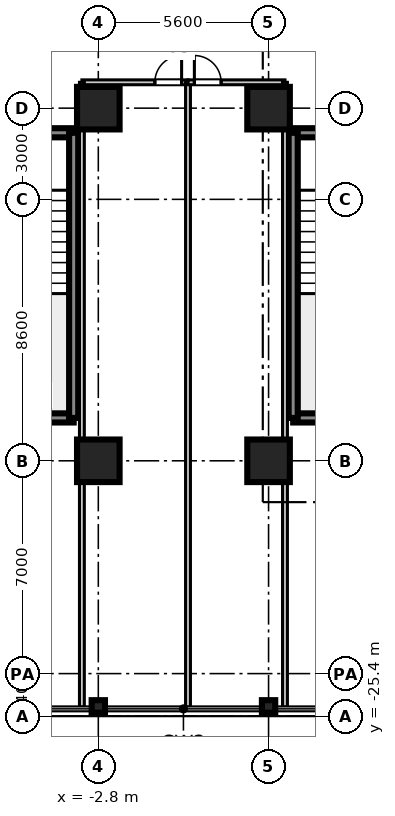
"""IFC4 building model, lengths in metres.
Left out: names, types, materials, properties, quantities, classifications, styles, units other than length and angle.
Written with IfcOpenShell. Run it as: python <this file> out.ifc"""

import sys

from ifc_helpers import new_model, si_unit, direction, frame, frame_2d, origin, origin_2d, place, context, subcontext, project, spatial, rectangle, i_section, extrude, source, transform, mapped, element, fill, save


model = new_model("IFC4")
c1 = context("Model", 3, precision=1e-05, world=origin(), true_north=direction((0.0, 1.0)))
c2 = subcontext(c1, "Body", "Model", "MODEL_VIEW")
j1 = project(units=[si_unit("LENGTHUNIT", "METRE"), si_unit("PLANEANGLEUNIT", "RADIAN")], contexts=[c1])
p1 = place(None, origin())
s1 = spatial("IfcSite", under=j1, at=p1, CompositionType="ELEMENT")
p2 = place(p1, origin())
s2 = spatial("IfcBuilding", under=s1, at=p2, CompositionType="ELEMENT")
p3 = place(p2, frame((0.0, 0.0, 39.7)))
s3 = spatial("IfcBuildingStorey", under=s2, at=p3, CompositionType="ELEMENT", Elevation=39.7)
m1 = source(origin(), c2, "Body", "SweptSolid", [
    extrude(rectangle(XDim=1.4, YDim=1.4, at=origin_2d()), origin(), (0.0, 0.0, 1.0), 3.605),
])
for number, where, z_axis, x_axis in (
    (1, (-2.8, -17.0, 0.0), (0.0, 0.0, 1.0), (1.0, 0.0, 0.0)),
    (2, (-2.8, -5.4, 0.0), (0.0, 0.0, 1.0), (1.0, 0.0, 0.0)),
    (3, (2.8, -17.0, 0.0), (0.0, 0.0, 1.0), (1.0, 0.0, 0.0)),
    (4, (2.8, -5.4, 0.0), (0.0, 0.0, 1.0), (1.0, 0.0, 0.0)),
):
    element("IfcColumn", number, at=place(p3, frame(where, z_axis=z_axis, x_axis=x_axis)), inside=s3, PredefinedType="COLUMN", context=c2, shape_type="MappedRepresentation", body=[
        mapped(m1, transform((0.0, 0.0, 0.0), scale=1.0)),
    ])
m2 = source(origin(), c2, "Body", "SweptSolid", [
    extrude(i_section(OverallWidth=0.412, OverallDepth=0.438, WebThickness=0.023, FlangeThickness=0.036, at=origin_2d()), origin(), (0.0, 0.0, 1.0), 3.605),
])
for number, where, z_axis, x_axis in (
    (5, (-2.8, -25.08, 0.0), (0.0, 0.0, 1.0), (0.0, 1.0, 0.0)),
    (6, (2.8, -25.08, 0.0), (0.0, 0.0, 1.0), (0.0, 1.0, 0.0)),
):
    element("IfcColumn", number, at=place(p3, frame(where, z_axis=z_axis, x_axis=x_axis)), inside=s3, PredefinedType="COLUMN", context=c2, shape_type="MappedRepresentation", body=[
        mapped(m2, transform((0.0, 0.0, 0.0), scale=1.0)),
    ])
m3 = source(origin(), c2, "Body", "SweptSolid", [
    extrude(rectangle(XDim=3.98, YDim=0.3, at=frame_2d((1.99, 0.0))), origin(), (0.0, 0.0, 1.0), 3.37),
])
for number, where, z_axis, x_axis in (
    (7, (3.61, -15.59, 0.0), (0.0, 0.0, 1.0), (1.0, 0.0, 0.0)),
    (8, (3.61, -6.21, 0.0), (0.0, 0.0, 1.0), (1.0, 0.0, 0.0)),
):
    element("IfcWall", number, at=place(p3, frame(where, z_axis=z_axis, x_axis=x_axis)), inside=s3, PredefinedType="SHEAR", context=c2, shape_type="MappedRepresentation", body=[
        mapped(m3, transform((0.0, 0.0, 0.0), scale=1.0)),
    ])
m4 = source(origin(), c2, "Body", "SweptSolid", [
    extrude(rectangle(XDim=9.38, YDim=0.3, at=frame_2d((4.69, 0.0))), origin(), (0.0, 0.0, 1.0), 3.37),
])
p4 = place(p3, frame((3.61, -15.59, 0.0), z_axis=(0.0, 0.0, 1.0), x_axis=(0.0, 1.0, 0.0)))
e9 = element("IfcWall", 9, at=p4, inside=s3, PredefinedType="SHEAR", context=c2, shape_type="MappedRepresentation", body=[
    mapped(m4, transform((0.0, 0.0, 0.0), scale=1.0)),
])
p5 = place(p3, frame((-7.59, -15.59, 0.0), z_axis=(0.0, 0.0, 1.0), x_axis=(1.0, 0.0, 0.0)))
e10 = element("IfcWall", 10, at=p5, inside=s3, PredefinedType="SHEAR", context=c2, shape_type="MappedRepresentation", body=[
    mapped(m3, transform((0.0, 0.0, 0.0), scale=1.0)),
])
p6 = place(p3, frame((-7.59, -6.21, 0.0), z_axis=(0.0, 0.0, 1.0), x_axis=(1.0, 0.0, 0.0)))
e11 = element("IfcWall", 11, at=p6, inside=s3, PredefinedType="SHEAR", context=c2, shape_type="MappedRepresentation", body=[
    mapped(m3, transform((0.0, 0.0, 0.0), scale=1.0)),
])
p7 = place(p6, frame((1.44, 0.0, 0.0)))
e12 = element("IfcOpeningElement", 12, at=p7, cuts=e11, PredefinedType="OPENING", context=c2, shape_type="SweptSolid", body=[
    extrude(rectangle(XDim=1.1, YDim=2.15, at=frame_2d((0.55, 1.075))), frame((0.0, 0.16, 0.0), z_axis=(0.0, -1.0, 0.0), x_axis=(1.0, 0.0, 0.0)), (0.0, 0.0, 1.0), 0.32),
])
p8 = place(p3, frame((-3.61, -15.59, 0.0), z_axis=(0.0, 0.0, 1.0), x_axis=(0.0, 1.0, 0.0)))
e13 = element("IfcWall", 13, at=p8, inside=s3, PredefinedType="SHEAR", context=c2, shape_type="MappedRepresentation", body=[
    mapped(m4, transform((0.0, 0.0, 0.0), scale=1.0)),
])
m5 = source(origin(), c2, "Body", "SweptSolid", [
    extrude(rectangle(XDim=3.49, YDim=0.16, at=frame_2d((1.745, 0.0))), origin(), (0.0, 0.0, 1.0), 2.71),
])
p9 = place(p3, frame((-3.34, -4.55, 0.0), z_axis=(0.0, 0.0, 1.0), x_axis=(1.0, 0.0, 0.0)))
e14 = element("IfcWall", 14, at=p9, inside=s3, PredefinedType="PARTITIONING", context=c2, shape_type="MappedRepresentation", body=[
    mapped(m5, transform((0.0, 0.0, 0.0), scale=1.0)),
])
p10 = place(p9, frame((2.4, 0.0, 0.0)))
e15 = element("IfcOpeningElement", 15, at=p10, cuts=e14, PredefinedType="OPENING", context=c2, shape_type="SweptSolid", body=[
    extrude(rectangle(XDim=0.88, YDim=2.1, at=frame_2d((0.44, 1.05))), frame((0.0, 0.09, 0.0), z_axis=(0.0, -1.0, 0.0), x_axis=(1.0, 0.0, 0.0)), (0.0, 0.0, 1.0), 0.18),
])
m6 = source(origin(), c2, "Body", "SweptSolid", [
    extrude(rectangle(XDim=20.55, YDim=0.16, at=frame_2d((10.275, 0.0))), origin(), (0.0, 0.0, 1.0), 2.71),
])
for number, where, z_axis, x_axis in (
    (16, (-3.34, -25.1, 0.0), (0.0, 0.0, 1.0), (0.0, 1.0, 0.0)),
    (17, (0.15, -25.1, 0.0), (0.0, 0.0, 1.0), (0.0, 1.0, 0.0)),
):
    element("IfcWall", number, at=place(p3, frame(where, z_axis=z_axis, x_axis=x_axis)), inside=s3, PredefinedType="PARTITIONING", context=c2, shape_type="MappedRepresentation", body=[
        mapped(m6, transform((0.0, 0.0, 0.0), scale=1.0)),
    ])
m7 = source(origin(), c2, "Body", "SweptSolid", [
    extrude(rectangle(XDim=3.19, YDim=0.16, at=frame_2d((1.595, 0.0))), origin(), (0.0, 0.0, 1.0), 2.71),
])
p11 = place(p3, frame((0.15, -4.55, 0.0), z_axis=(0.0, 0.0, 1.0), x_axis=(1.0, 0.0, 0.0)))
e18 = element("IfcWall", 18, at=p11, inside=s3, PredefinedType="PARTITIONING", context=c2, shape_type="MappedRepresentation", body=[
    mapped(m7, transform((0.0, 0.0, 0.0), scale=1.0)),
])
p12 = place(p11, frame((0.21, 0.0, 0.0)))
e19 = element("IfcOpeningElement", 19, at=p12, cuts=e18, PredefinedType="OPENING", context=c2, shape_type="SweptSolid", body=[
    extrude(rectangle(XDim=0.88, YDim=2.1, at=frame_2d((0.44, 1.05))), frame((0.0, 0.09, 0.0), z_axis=(0.0, -1.0, 0.0), x_axis=(1.0, 0.0, 0.0)), (0.0, 0.0, 1.0), 0.18),
])
p13 = place(p3, frame((3.34, -25.1, 0.0), z_axis=(0.0, 0.0, 1.0), x_axis=(0.0, 1.0, 0.0)))
e20 = element("IfcWall", 20, at=p13, inside=s3, PredefinedType="PARTITIONING", context=c2, shape_type="MappedRepresentation", body=[
    mapped(m6, transform((0.0, 0.0, 0.0), scale=1.0)),
])
m8 = source(origin(), c2, "Body", "SweptSolid", [
    extrude(rectangle(XDim=0.88, YDim=2.1, at=frame_2d((0.44, 1.05))), frame((0.0, 0.025, 0.0), z_axis=(0.0, -1.0, 0.0), x_axis=(1.0, 0.0, 0.0)), (0.0, 0.0, 1.0), 0.05),
])
p14 = place(p10, frame((0.88, 0.0, 0.0), z_axis=(0.0, 0.0, 1.0), x_axis=(-1.0, 0.0, 0.0)))
e21 = element("IfcDoor", 21, at=p14, inside=s3, OperationType="SINGLE_SWING_RIGHT", PredefinedType="DOOR", context=c2, shape_type="MappedRepresentation", body=[
    mapped(m8, transform((0.0, 0.0, 0.0), scale=1.0)),
])
fill(e15, e21)
p15 = place(p12, frame((0.88, 0.0, 0.0), z_axis=(0.0, 0.0, 1.0), x_axis=(-1.0, 0.0, 0.0)))
e22 = element("IfcDoor", 22, at=p15, inside=s3, OperationType="SINGLE_SWING_LEFT", PredefinedType="DOOR", context=c2, shape_type="MappedRepresentation", body=[
    mapped(m8, transform((0.0, 0.0, 0.0), scale=1.0)),
])
fill(e19, e22)
save(model, sys.argv[1])
